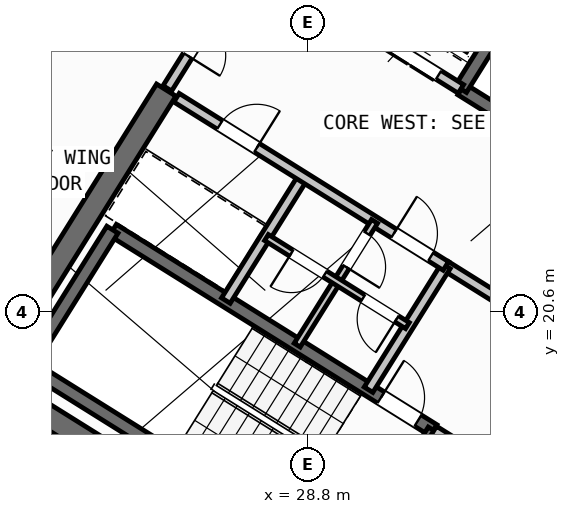
"""IFC4 building model, lengths in metres.
Left out: names, types, materials, properties, quantities, classifications, styles, units other than length and angle.
Written with IfcOpenShell. Run it as: python <this file> out.ifc"""

import sys

from ifc_helpers import new_model, si_unit, direction, frame, frame_2d, origin, place, context, subcontext, project, spatial, rectangle, extrude, source, transform, mapped, element, fill, save


model = new_model("IFC4")
c1 = context("Model", 3, precision=1e-05, world=origin(), true_north=direction((0.0, 1.0)))
c2 = subcontext(c1, "Body", "Model", "MODEL_VIEW")
j1 = project(units=[si_unit("LENGTHUNIT", "METRE"), si_unit("PLANEANGLEUNIT", "RADIAN")], contexts=[c1])
p1 = place(None, origin())
s1 = spatial("IfcSite", under=j1, at=p1, CompositionType="ELEMENT")
p2 = place(p1, origin())
s2 = spatial("IfcBuilding", under=s1, at=p2, CompositionType="ELEMENT")
p3 = place(p2, frame((0.0, 0.0, 242.1)))
s3 = spatial("IfcBuildingStorey", under=s2, at=p3, CompositionType="ELEMENT", Elevation=242.1)
p4 = place(p3, frame((40.531, 24.036, 0.0), z_axis=(0.0, 0.0, 1.0), x_axis=(-0.848048787466, 0.529918157905, 0.0)))
e1 = element("IfcWall", 1, at=p4, inside=s3, PredefinedType="SHEAR", context=c2, shape_type="SweptSolid", body=[
    extrude(rectangle(XDim=13.04, YDim=0.45, at=frame_2d((6.52, 0.0))), origin(), (0.0, 0.0, 1.0), 3.32),
])
p5 = place(p3, frame((33.324, 12.503, 0.0), z_axis=(0.0, 0.0, 1.0), x_axis=(-0.848043529849, 0.529926571782, 0.0)))
e2 = element("IfcWall", 2, at=p5, inside=s3, PredefinedType="SHEAR", context=c2, shape_type="SweptSolid", body=[
    extrude(rectangle(XDim=13.04, YDim=0.45, at=frame_2d((6.52, 0.0))), origin(), (0.0, 0.0, 1.0), 3.32),
])
p6 = place(p3, frame((26.007, 24.976, 0.0), z_axis=(0.0, 0.0, 1.0), x_axis=(-0.529931155655, -0.848040665456, 0.0)))
e3 = element("IfcWall", 3, at=p6, inside=s3, PredefinedType="SHEAR", context=c2, shape_type="SweptSolid", body=[
    extrude(rectangle(XDim=6.475, YDim=0.45, at=frame_2d((3.238, 0.0))), origin(), (0.0, 0.0, 1.0), 3.32),
])
p7 = place(p3, frame((29.268, 6.429, 0.0), z_axis=(0.0, 0.0, 1.0), x_axis=(-0.848049971435, 0.529916263149, 0.0)))
e4 = element("IfcWall", 4, at=p7, inside=s3, PredefinedType="STANDARD", context=c2, shape_type="SweptSolid", body=[
    extrude(rectangle(XDim=31.588, YDim=0.32, at=frame_2d((15.794, 0.0))), origin(), (0.0, 0.0, 1.0), 3.32),
])
p8 = place(p7, frame((16.235, 0.0, 0.0)))
e5 = element("IfcOpeningElement", 5, at=p8, cuts=e4, PredefinedType="OPENING", context=c2, shape_type="SweptSolid", body=[
    extrude(rectangle(XDim=1.2, YDim=2.15, at=frame_2d((0.6, 1.075))), frame((0.0, 0.17, 0.0), z_axis=(0.0, -1.0, 0.0), x_axis=(1.0, 0.0, 0.0)), (0.0, 0.0, 1.0), 0.34),
])
p9 = place(p7, frame((3.859, 0.0, 0.9)))
e6 = element("IfcOpeningElement", 6, at=p9, cuts=e4, PredefinedType="OPENING", context=c2, shape_type="SweptSolid", body=[
    extrude(rectangle(XDim=1.65, YDim=1.45, at=frame_2d((0.825, 0.725))), frame((0.0, 0.17, 0.0), z_axis=(0.0, -1.0, 0.0), x_axis=(1.0, 0.0, 0.0)), (0.0, 0.0, 1.0), 0.34),
])
p10 = place(p7, frame((10.519, 0.0, 0.9)))
e7 = element("IfcOpeningElement", 7, at=p10, cuts=e4, PredefinedType="OPENING", context=c2, shape_type="SweptSolid", body=[
    extrude(rectangle(XDim=1.65, YDim=1.45, at=frame_2d((0.825, 0.725))), frame((0.0, 0.17, 0.0), z_axis=(0.0, -1.0, 0.0), x_axis=(1.0, 0.0, 0.0)), (0.0, 0.0, 1.0), 0.34),
])
p11 = place(p7, frame((19.182, 0.0, 1.0)))
e8 = element("IfcOpeningElement", 8, at=p11, cuts=e4, PredefinedType="OPENING", context=c2, shape_type="SweptSolid", body=[
    extrude(rectangle(XDim=0.9, YDim=1.25, at=frame_2d((0.45, 0.625))), frame((0.0, 0.17, 0.0), z_axis=(0.0, -1.0, 0.0), x_axis=(1.0, 0.0, 0.0)), (0.0, 0.0, 1.0), 0.34),
])
p12 = place(p7, frame((22.524, 0.0, 1.0)))
e9 = element("IfcOpeningElement", 9, at=p12, cuts=e4, PredefinedType="OPENING", context=c2, shape_type="SweptSolid", body=[
    extrude(rectangle(XDim=0.9, YDim=1.25, at=frame_2d((0.45, 0.625))), frame((0.0, 0.17, 0.0), z_axis=(0.0, -1.0, 0.0), x_axis=(1.0, 0.0, 0.0)), (0.0, 0.0, 1.0), 0.34),
])
p13 = place(p7, frame((25.658, 0.0, 0.9)))
e10 = element("IfcOpeningElement", 10, at=p13, cuts=e4, PredefinedType="OPENING", context=c2, shape_type="SweptSolid", body=[
    extrude(rectangle(XDim=1.65, YDim=1.45, at=frame_2d((0.825, 0.725))), frame((0.0, 0.17, 0.0), z_axis=(0.0, -1.0, 0.0), x_axis=(1.0, 0.0, 0.0)), (0.0, 0.0, 1.0), 0.34),
])
p14 = place(p7, frame((29.278, 0.0, 0.9)))
e11 = element("IfcOpeningElement", 11, at=p14, cuts=e4, PredefinedType="OPENING", context=c2, shape_type="SweptSolid", body=[
    extrude(rectangle(XDim=1.35, YDim=1.45, at=frame_2d((0.675, 0.725))), frame((0.0, 0.17, 0.0), z_axis=(0.0, -1.0, 0.0), x_axis=(1.0, 0.0, 0.0)), (0.0, 0.0, 1.0), 0.34),
])
p15 = place(p3, frame((14.138, 41.825, 0.0), z_axis=(0.0, 0.0, 1.0), x_axis=(0.848046498049, -0.529921821731, 0.0)))
e12 = element("IfcWall", 12, at=p15, inside=s3, PredefinedType="STANDARD", context=c2, shape_type="SweptSolid", body=[
    extrude(rectangle(XDim=31.588, YDim=0.32, at=frame_2d((15.794, 0.0))), origin(), (0.0, 0.0, 1.0), 3.32),
])
p16 = place(p15, frame((9.712, 0.0, 0.0)))
e13 = element("IfcOpeningElement", 13, at=p16, cuts=e12, PredefinedType="OPENING", context=c2, shape_type="SweptSolid", body=[
    extrude(rectangle(XDim=1.05, YDim=2.15, at=frame_2d((0.525, 1.075))), frame((0.0, 0.17, 0.0), z_axis=(0.0, -1.0, 0.0), x_axis=(1.0, 0.0, 0.0)), (0.0, 0.0, 1.0), 0.34),
])
p17 = place(p15, frame((0.841, 0.0, 0.9)))
e14 = element("IfcOpeningElement", 14, at=p17, cuts=e12, PredefinedType="OPENING", context=c2, shape_type="SweptSolid", body=[
    extrude(rectangle(XDim=1.65, YDim=1.45, at=frame_2d((0.825, 0.725))), frame((0.0, 0.17, 0.0), z_axis=(0.0, -1.0, 0.0), x_axis=(1.0, 0.0, 0.0)), (0.0, 0.0, 1.0), 0.34),
])
p18 = place(p15, frame((4.171, 0.0, 1.0)))
e15 = element("IfcOpeningElement", 15, at=p18, cuts=e12, PredefinedType="OPENING", context=c2, shape_type="SweptSolid", body=[
    extrude(rectangle(XDim=0.9, YDim=1.25, at=frame_2d((0.45, 0.625))), frame((0.0, 0.17, 0.0), z_axis=(0.0, -1.0, 0.0), x_axis=(1.0, 0.0, 0.0)), (0.0, 0.0, 1.0), 0.34),
])
p19 = place(p15, frame((13.624, 0.0, 0.95)))
e16 = element("IfcOpeningElement", 16, at=p19, cuts=e12, PredefinedType="OPENING", context=c2, shape_type="SweptSolid", body=[
    extrude(rectangle(XDim=1.95, YDim=1.35, at=frame_2d((0.975, 0.675))), frame((0.0, 0.17, 0.0), z_axis=(0.0, -1.0, 0.0), x_axis=(1.0, 0.0, 0.0)), (0.0, 0.0, 1.0), 0.34),
])
p20 = place(p15, frame((17.129, 0.0, 1.0)))
e17 = element("IfcOpeningElement", 17, at=p20, cuts=e12, PredefinedType="OPENING", context=c2, shape_type="SweptSolid", body=[
    extrude(rectangle(XDim=0.9, YDim=1.25, at=frame_2d((0.45, 0.625))), frame((0.0, 0.17, 0.0), z_axis=(0.0, -1.0, 0.0), x_axis=(1.0, 0.0, 0.0)), (0.0, 0.0, 1.0), 0.34),
])
p21 = place(p15, frame((21.744, 0.0, 0.9)))
e18 = element("IfcOpeningElement", 18, at=p21, cuts=e12, PredefinedType="OPENING", context=c2, shape_type="SweptSolid", body=[
    extrude(rectangle(XDim=1.65, YDim=1.45, at=frame_2d((0.825, 0.725))), frame((0.0, 0.17, 0.0), z_axis=(0.0, -1.0, 0.0), x_axis=(1.0, 0.0, 0.0)), (0.0, 0.0, 1.0), 0.34),
])
p22 = place(p15, frame((27.394, 0.0, 0.9)))
e19 = element("IfcOpeningElement", 19, at=p22, cuts=e12, PredefinedType="OPENING", context=c2, shape_type="SweptSolid", body=[
    extrude(rectangle(XDim=1.65, YDim=1.45, at=frame_2d((0.825, 0.725))), frame((0.0, 0.17, 0.0), z_axis=(0.0, -1.0, 0.0), x_axis=(1.0, 0.0, 0.0)), (0.0, 0.0, 1.0), 0.34),
])
p23 = place(p3, frame((29.605, 15.581, 0.0), z_axis=(0.0, 0.0, 1.0), x_axis=(-0.848036911448, 0.529937163087, 0.0)))
e20 = element("IfcWall", 20, at=p23, inside=s3, PredefinedType="SHEAR", context=c2, shape_type="SweptSolid", body=[
    extrude(rectangle(XDim=7.46, YDim=0.26, at=frame_2d((3.73, 0.0))), origin(), (0.0, 0.0, 1.0), 3.32),
])
p24 = place(p3, frame((31.28, 18.261, 0.0), z_axis=(0.0, 0.0, 1.0), x_axis=(-0.848051618787, 0.529913626805, 0.0)))
e21 = element("IfcWall", 21, at=p24, inside=s3, PredefinedType="SHEAR", context=c2, shape_type="SweptSolid", body=[
    extrude(rectangle(XDim=7.46, YDim=0.26, at=frame_2d((3.73, 0.0))), origin(), (0.0, 0.0, 1.0), 3.32),
])
p25 = place(p24, frame((0.36, 0.0, 0.0)))
e22 = element("IfcOpeningElement", 22, at=p25, cuts=e21, PredefinedType="OPENING", context=c2, shape_type="SweptSolid", body=[
    extrude(rectangle(XDim=0.86, YDim=2.05, at=frame_2d((0.43, 1.025))), frame((0.0, 0.14, 0.0), z_axis=(0.0, -1.0, 0.0), x_axis=(1.0, 0.0, 0.0)), (0.0, 0.0, 1.0), 0.28),
])
p26 = place(p3, frame((31.288, 18.256, 0.0), z_axis=(0.0, 0.0, 1.0), x_axis=(-0.529943379326, -0.848033026897, 0.0)))
e23 = element("IfcWall", 23, at=p26, inside=s3, PredefinedType="SHEAR", context=c2, shape_type="SweptSolid", body=[
    extrude(rectangle(XDim=3.16, YDim=0.26, at=frame_2d((1.58, 0.0))), origin(), (0.0, 0.0, 1.0), 3.32),
])
p27 = place(p3, frame((24.945, 22.22, 0.0), z_axis=(0.0, 0.0, 1.0), x_axis=(-0.529908658664, -0.84805472316, 0.0)))
e24 = element("IfcWall", 24, at=p27, inside=s3, PredefinedType="SHEAR", context=c2, shape_type="SweptSolid", body=[
    extrude(rectangle(XDim=3.16, YDim=0.26, at=frame_2d((1.58, 0.0))), origin(), (0.0, 0.0, 1.0), 3.32),
])
p28 = place(p3, frame((38.046, 21.108, 0.0), z_axis=(0.0, 0.0, 1.0), x_axis=(-0.848054434086, 0.529909121291, 0.0)))
e25 = element("IfcWall", 25, at=p28, inside=s3, PredefinedType="SHEAR", context=c2, shape_type="SweptSolid", body=[
    extrude(rectangle(XDim=7.33, YDim=0.26, at=frame_2d((3.665, 0.0))), origin(), (0.0, 0.0, 1.0), 3.32),
])
p29 = place(p28, frame((0.22, 0.0, 0.0)))
e26 = element("IfcOpeningElement", 26, at=p29, cuts=e25, PredefinedType="OPENING", context=c2, shape_type="SweptSolid", body=[
    extrude(rectangle(XDim=1.1, YDim=2.1, at=frame_2d((0.55, 1.05))), frame((0.0, 0.14, 0.0), z_axis=(0.0, -1.0, 0.0), x_axis=(1.0, 0.0, 0.0)), (0.0, 0.0, 1.0), 0.28),
])
p30 = place(p3, frame((33.496, 27.677, 0.0), z_axis=(0.0, 0.0, 1.0), x_axis=(-0.529908658664, -0.84805472316, 0.0)))
e27 = element("IfcWall", 27, at=p30, inside=s3, PredefinedType="SHEAR", context=c2, shape_type="SweptSolid", body=[
    extrude(rectangle(XDim=3.16, YDim=0.26, at=frame_2d((1.58, 0.0))), origin(), (0.0, 0.0, 1.0), 3.32),
])
p31 = place(p3, frame((34.933, 15.978, 0.0), z_axis=(0.0, 0.0, 1.0), x_axis=(-0.848055739377, 0.529907032327, 0.0)))
e28 = element("IfcWall", 28, at=p31, inside=s3, PredefinedType="STANDARD", context=c2, shape_type="SweptSolid", body=[
    extrude(rectangle(XDim=4.298, YDim=0.2, at=frame_2d((2.149, 0.0))), origin(), (0.0, 0.0, 1.0), 3.31),
])
p32 = place(p31, frame((0.448, 0.0, 0.0)))
e29 = element("IfcOpeningElement", 29, at=p32, cuts=e28, PredefinedType="OPENING", context=c2, shape_type="SweptSolid", body=[
    extrude(rectangle(XDim=1.3, YDim=2.2, at=frame_2d((0.65, 1.1))), frame((0.0, 0.11, 0.0), z_axis=(0.0, -1.0, 0.0), x_axis=(1.0, 0.0, 0.0)), (0.0, 0.0, 1.0), 0.22),
])
p33 = place(p31, frame((2.523, 0.0, 0.0)))
e30 = element("IfcOpeningElement", 30, at=p33, cuts=e28, PredefinedType="OPENING", context=c2, shape_type="SweptSolid", body=[
    extrude(rectangle(XDim=1.45, YDim=2.25, at=frame_2d((0.725, 1.125))), frame((0.0, 0.11, 0.0), z_axis=(0.0, -1.0, 0.0), x_axis=(1.0, 0.0, 0.0)), (0.0, 0.0, 1.0), 0.22),
])
p34 = place(p3, frame((36.459, 18.421, 0.0), z_axis=(0.0, 0.0, 1.0), x_axis=(-0.848059591691, 0.529900867089, 0.0)))
e31 = element("IfcWall", 31, at=p34, inside=s3, PredefinedType="STANDARD", context=c2, shape_type="SweptSolid", body=[
    extrude(rectangle(XDim=5.818, YDim=0.2, at=frame_2d((2.909, 0.0))), origin(), (0.0, 0.0, 1.0), 3.31),
])
p35 = place(p34, frame((2.598, 0.0, 0.0)))
e32 = element("IfcOpeningElement", 32, at=p35, cuts=e31, PredefinedType="OPENING", context=c2, shape_type="SweptSolid", body=[
    extrude(rectangle(XDim=1.15, YDim=2.1, at=frame_2d((0.575, 1.05))), frame((0.0, 0.11, 0.0), z_axis=(0.0, -1.0, 0.0), x_axis=(1.0, 0.0, 0.0)), (0.0, 0.0, 1.0), 0.22),
])
p36 = place(p3, frame((31.822, 24.998, 0.0), z_axis=(0.0, 0.0, 1.0), x_axis=(-0.848054125777, 0.529909614701, 0.0)))
e33 = element("IfcWall", 33, at=p36, inside=s3, PredefinedType="STANDARD", context=c2, shape_type="SweptSolid", body=[
    extrude(rectangle(XDim=4.668, YDim=0.2, at=frame_2d((2.334, 0.0))), origin(), (0.0, 0.0, 1.0), 3.31),
])
p37 = place(p36, frame((0.52, 0.0, 0.0)))
e34 = element("IfcOpeningElement", 34, at=p37, cuts=e33, PredefinedType="OPENING", context=c2, shape_type="SweptSolid", body=[
    extrude(rectangle(XDim=1.2, YDim=2.15, at=frame_2d((0.6, 1.075))), frame((0.0, 0.11, 0.0), z_axis=(0.0, -1.0, 0.0), x_axis=(1.0, 0.0, 0.0)), (0.0, 0.0, 1.0), 0.22),
])
p38 = place(p36, frame((2.54, 0.0, 0.0)))
e35 = element("IfcOpeningElement", 35, at=p38, cuts=e33, PredefinedType="OPENING", context=c2, shape_type="SweptSolid", body=[
    extrude(rectangle(XDim=1.2, YDim=2.15, at=frame_2d((0.6, 1.075))), frame((0.0, 0.11, 0.0), z_axis=(0.0, -1.0, 0.0), x_axis=(1.0, 0.0, 0.0)), (0.0, 0.0, 1.0), 0.22),
])
for number, where, z_axis, x_axis in (
    (36, (31.525, 21.504, 0.0), (0.0, 0.0, 1.0), (-0.53, -0.848, 0.0)),
    (37, (28.71, 23.263, 0.0), (0.0, 0.0, 1.0), (-0.53, -0.848, 0.0)),
):
    element("IfcWall", number, at=place(p3, frame(where, z_axis=z_axis, x_axis=x_axis)), inside=s3, PredefinedType="STANDARD", context=c2, shape_type="SweptSolid", body=[
        extrude(rectangle(XDim=2.88, YDim=0.2, at=frame_2d((1.44, 0.0))), origin(), (0.0, 0.0, 1.0), 3.31),
    ])
p39 = place(p3, frame((31.525, 21.504, 0.0), z_axis=(0.0, 0.0, 1.0), x_axis=(-0.848042066329, 0.529928913853, 0.0)))
e38 = element("IfcWall", 38, at=p39, inside=s3, PredefinedType="STANDARD", context=c2, shape_type="SweptSolid", body=[
    extrude(rectangle(XDim=6.268, YDim=0.2, at=frame_2d((3.134, 0.0))), origin(), (0.0, 0.0, 1.0), 3.31),
])
p40 = place(p39, frame((4.4, 0.0, 0.0)))
e39 = element("IfcOpeningElement", 39, at=p40, cuts=e38, PredefinedType="OPENING", context=c2, shape_type="SweptSolid", body=[
    extrude(rectangle(XDim=0.86, YDim=2.05, at=frame_2d((0.43, 1.025))), frame((0.0, 0.11, 0.0), z_axis=(0.0, -1.0, 0.0), x_axis=(1.0, 0.0, 0.0)), (0.0, 0.0, 1.0), 0.22),
])
p41 = place(p39, frame((0.35, 0.0, 0.0)))
e40 = element("IfcOpeningElement", 40, at=p41, cuts=e38, PredefinedType="OPENING", context=c2, shape_type="SweptSolid", body=[
    extrude(rectangle(XDim=0.86, YDim=2.05, at=frame_2d((0.43, 1.025))), frame((0.0, 0.11, 0.0), z_axis=(0.0, -1.0, 0.0), x_axis=(1.0, 0.0, 0.0)), (0.0, 0.0, 1.0), 0.22),
])
p42 = place(p3, frame((30.117, 22.384, 0.0), z_axis=(0.0, 0.0, 1.0), x_axis=(-0.529951914384, -0.848027693204, 0.0)))
e41 = element("IfcWall", 41, at=p42, inside=s3, PredefinedType="PLUMBINGWALL", context=c2, shape_type="SweptSolid", body=[
    extrude(rectangle(XDim=1.4, YDim=0.14, at=frame_2d((0.7, 0.0))), origin(), (0.0, 0.0, 1.0), 3.31),
])
p43 = place(p42, frame((0.28, 0.0, 0.0)))
e42 = element("IfcOpeningElement", 42, at=p43, cuts=e41, PredefinedType="OPENING", context=c2, shape_type="SweptSolid", body=[
    extrude(rectangle(XDim=0.78, YDim=2.05, at=frame_2d((0.39, 1.025))), frame((0.0, 0.08, 0.0), z_axis=(0.0, -1.0, 0.0), x_axis=(1.0, 0.0, 0.0)), (0.0, 0.0, 1.0), 0.16),
])
p44 = place(p3, frame((29.375, 21.196, 0.0), z_axis=(0.0, 0.0, 1.0), x_axis=(-0.529865479138, -0.848081702443, 0.0)))
e43 = element("IfcWall", 43, at=p44, inside=s3, PredefinedType="PLUMBINGWALL", context=c2, shape_type="SweptSolid", body=[
    extrude(rectangle(XDim=1.48, YDim=0.14, at=frame_2d((0.74, 0.0))), origin(), (0.0, 0.0, 1.0), 3.31),
])
p45 = place(p3, frame((30.766, 20.327, 0.0), z_axis=(0.0, 0.0, 1.0), x_axis=(-0.848052663127, 0.529911955482, 0.0)))
e44 = element("IfcWall", 44, at=p45, inside=s3, PredefinedType="PLUMBINGWALL", context=c2, shape_type="SweptSolid", body=[
    extrude(rectangle(XDim=3.28, YDim=0.14, at=frame_2d((1.64, 0.0))), origin(), (0.0, 0.0, 1.0), 3.31),
])
p46 = place(p45, frame((0.25, 0.0, 0.0)))
e45 = element("IfcOpeningElement", 45, at=p46, cuts=e44, PredefinedType="OPENING", context=c2, shape_type="SweptSolid", body=[
    extrude(rectangle(XDim=0.78, YDim=2.05, at=frame_2d((0.39, 1.025))), frame((0.0, 0.08, 0.0), z_axis=(0.0, -1.0, 0.0), x_axis=(1.0, 0.0, 0.0)), (0.0, 0.0, 1.0), 0.16),
])
p47 = place(p45, frame((1.92, 0.0, 0.0)))
e46 = element("IfcOpeningElement", 46, at=p47, cuts=e44, PredefinedType="OPENING", context=c2, shape_type="SweptSolid", body=[
    extrude(rectangle(XDim=0.78, YDim=2.05, at=frame_2d((0.39, 1.025))), frame((0.0, 0.08, 0.0), z_axis=(0.0, -1.0, 0.0), x_axis=(1.0, 0.0, 0.0)), (0.0, 0.0, 1.0), 0.16),
])
p48 = place(p3, frame((27.596, 27.52, 0.0), z_axis=(0.0, 0.0, 1.0), x_axis=(-0.529865479138, -0.848081702443, 0.0)))
e47 = element("IfcWall", 47, at=p48, inside=s3, PredefinedType="STANDARD", context=c2, shape_type="SweptSolid", body=[
    extrude(rectangle(XDim=2.96, YDim=0.2, at=frame_2d((1.48, 0.0))), origin(), (0.0, 0.0, 1.0), 3.31),
])
p49 = place(p48, frame((0.7, 0.0, 0.0)))
e48 = element("IfcOpeningElement", 48, at=p49, cuts=e47, PredefinedType="OPENING", context=c2, shape_type="SweptSolid", body=[
    extrude(rectangle(XDim=1.5, YDim=2.15, at=frame_2d((0.75, 1.075))), frame((0.0, 0.11, 0.0), z_axis=(0.0, -1.0, 0.0), x_axis=(1.0, 0.0, 0.0)), (0.0, 0.0, 1.0), 0.22),
])
p50 = place(p3, frame((27.953, 33.016, 0.0), z_axis=(0.0, 0.0, 1.0), x_axis=(-0.529903001606, -0.848058257957, 0.0)))
e49 = element("IfcWall", 49, at=p50, inside=s3, PredefinedType="PARTITIONING", context=c2, shape_type="SweptSolid", body=[
    extrude(rectangle(XDim=9.15, YDim=0.16, at=frame_2d((4.575, 0.0))), origin(), (0.0, 0.0, 1.0), 3.31),
])
p51 = place(p3, frame((32.164, 10.374, 0.0), z_axis=(0.0, 0.0, 1.0), x_axis=(-0.848044107957, 0.529925646633, 0.0)))
e50 = element("IfcWall", 50, at=p51, inside=s3, PredefinedType="PARTITIONING", context=c2, shape_type="SweptSolid", body=[
    extrude(rectangle(XDim=15.57, YDim=0.16, at=frame_2d((7.785, 0.0))), origin(), (0.0, 0.0, 1.0), 3.31),
])
p52 = place(p51, frame((10.83, 0.0, 0.0)))
e51 = element("IfcOpeningElement", 51, at=p52, cuts=e50, PredefinedType="OPENING", context=c2, shape_type="SweptSolid", body=[
    extrude(rectangle(XDim=1.0, YDim=2.1, at=frame_2d((0.5, 1.05))), frame((0.0, 0.09, 0.0), z_axis=(0.0, -1.0, 0.0), x_axis=(1.0, 0.0, 0.0)), (0.0, 0.0, 1.0), 0.18),
])
m1 = source(origin(), c2, "Body", "SweptSolid", [
    extrude(rectangle(XDim=0.86, YDim=2.05, at=frame_2d((0.43, 1.025))), frame((0.0, 0.025, 0.0), z_axis=(0.0, -1.0, 0.0), x_axis=(1.0, 0.0, 0.0)), (0.0, 0.0, 1.0), 0.05),
])
p53 = place(p25, frame((0.86, 0.0, 0.0), z_axis=(0.0, 0.0, 1.0), x_axis=(-1.0, 0.0, 0.0)))
e52 = element("IfcDoor", 52, at=p53, inside=s3, OperationType="SINGLE_SWING_LEFT", PredefinedType="DOOR", context=c2, shape_type="MappedRepresentation", body=[
    mapped(m1, transform((0.0, 0.0, 0.0), scale=1.0)),
])
fill(e22, e52)
m2 = source(origin(), c2, "Body", "SweptSolid", [
    extrude(rectangle(XDim=1.2, YDim=2.15, at=frame_2d((0.6, 1.075))), frame((0.0, 0.025, 0.0), z_axis=(0.0, -1.0, 0.0), x_axis=(1.0, 0.0, 0.0)), (0.0, 0.0, 1.0), 0.05),
])
p54 = place(p37, origin())
e53 = element("IfcDoor", 53, at=p54, inside=s3, OperationType="DOUBLE_DOOR_SLIDING", PredefinedType="DOOR", context=c2, shape_type="MappedRepresentation", body=[
    mapped(m2, transform((0.0, 0.0, 0.0), scale=1.0)),
])
fill(e34, e53)
p55 = place(p40, frame((0.86, 0.0, 0.0), z_axis=(0.0, 0.0, 1.0), x_axis=(-1.0, 0.0, 0.0)))
e54 = element("IfcDoor", 54, at=p55, inside=s3, OperationType="SINGLE_SWING_RIGHT", PredefinedType="DOOR", context=c2, shape_type="MappedRepresentation", body=[
    mapped(m1, transform((0.0, 0.0, 0.0), scale=1.0)),
])
fill(e39, e54)
p56 = place(p41, frame((0.86, 0.0, 0.0), z_axis=(0.0, 0.0, 1.0), x_axis=(-1.0, 0.0, 0.0)))
e55 = element("IfcDoor", 55, at=p56, inside=s3, OperationType="SINGLE_SWING_LEFT", PredefinedType="DOOR", context=c2, shape_type="MappedRepresentation", body=[
    mapped(m1, transform((0.0, 0.0, 0.0), scale=1.0)),
])
fill(e40, e55)
m3 = source(origin(), c2, "Body", "SweptSolid", [
    extrude(rectangle(XDim=0.78, YDim=2.05, at=frame_2d((0.39, 1.025))), frame((0.0, 0.025, 0.0), z_axis=(0.0, -1.0, 0.0), x_axis=(1.0, 0.0, 0.0)), (0.0, 0.0, 1.0), 0.05),
])
p57 = place(p43, origin())
e56 = element("IfcDoor", 56, at=p57, inside=s3, OperationType="SINGLE_SWING_RIGHT", PredefinedType="DOOR", context=c2, shape_type="MappedRepresentation", body=[
    mapped(m3, transform((0.0, 0.0, 0.0), scale=1.0)),
])
fill(e42, e56)
p58 = place(p46, origin())
e57 = element("IfcDoor", 57, at=p58, inside=s3, OperationType="SINGLE_SWING_LEFT", PredefinedType="DOOR", context=c2, shape_type="MappedRepresentation", body=[
    mapped(m3, transform((0.0, 0.0, 0.0), scale=1.0)),
])
fill(e45, e57)
p59 = place(p47, origin())
e58 = element("IfcDoor", 58, at=p59, inside=s3, OperationType="SINGLE_SWING_RIGHT", PredefinedType="DOOR", context=c2, shape_type="MappedRepresentation", body=[
    mapped(m3, transform((0.0, 0.0, 0.0), scale=1.0)),
])
fill(e46, e58)
m4 = source(origin(), c2, "Body", "SweptSolid", [
    extrude(rectangle(XDim=1.5, YDim=2.15, at=frame_2d((0.75, 1.075))), frame((0.0, 0.025, 0.0), z_axis=(0.0, -1.0, 0.0), x_axis=(1.0, 0.0, 0.0)), (0.0, 0.0, 1.0), 0.05),
])
p60 = place(p49, origin())
e59 = element("IfcDoor", 59, at=p60, inside=s3, OperationType="DOUBLE_DOOR_SINGLE_SWING", PredefinedType="DOOR", context=c2, shape_type="MappedRepresentation", body=[
    mapped(m4, transform((0.0, 0.0, 0.0), scale=1.0)),
])
fill(e48, e59)
save(model, sys.argv[1])
